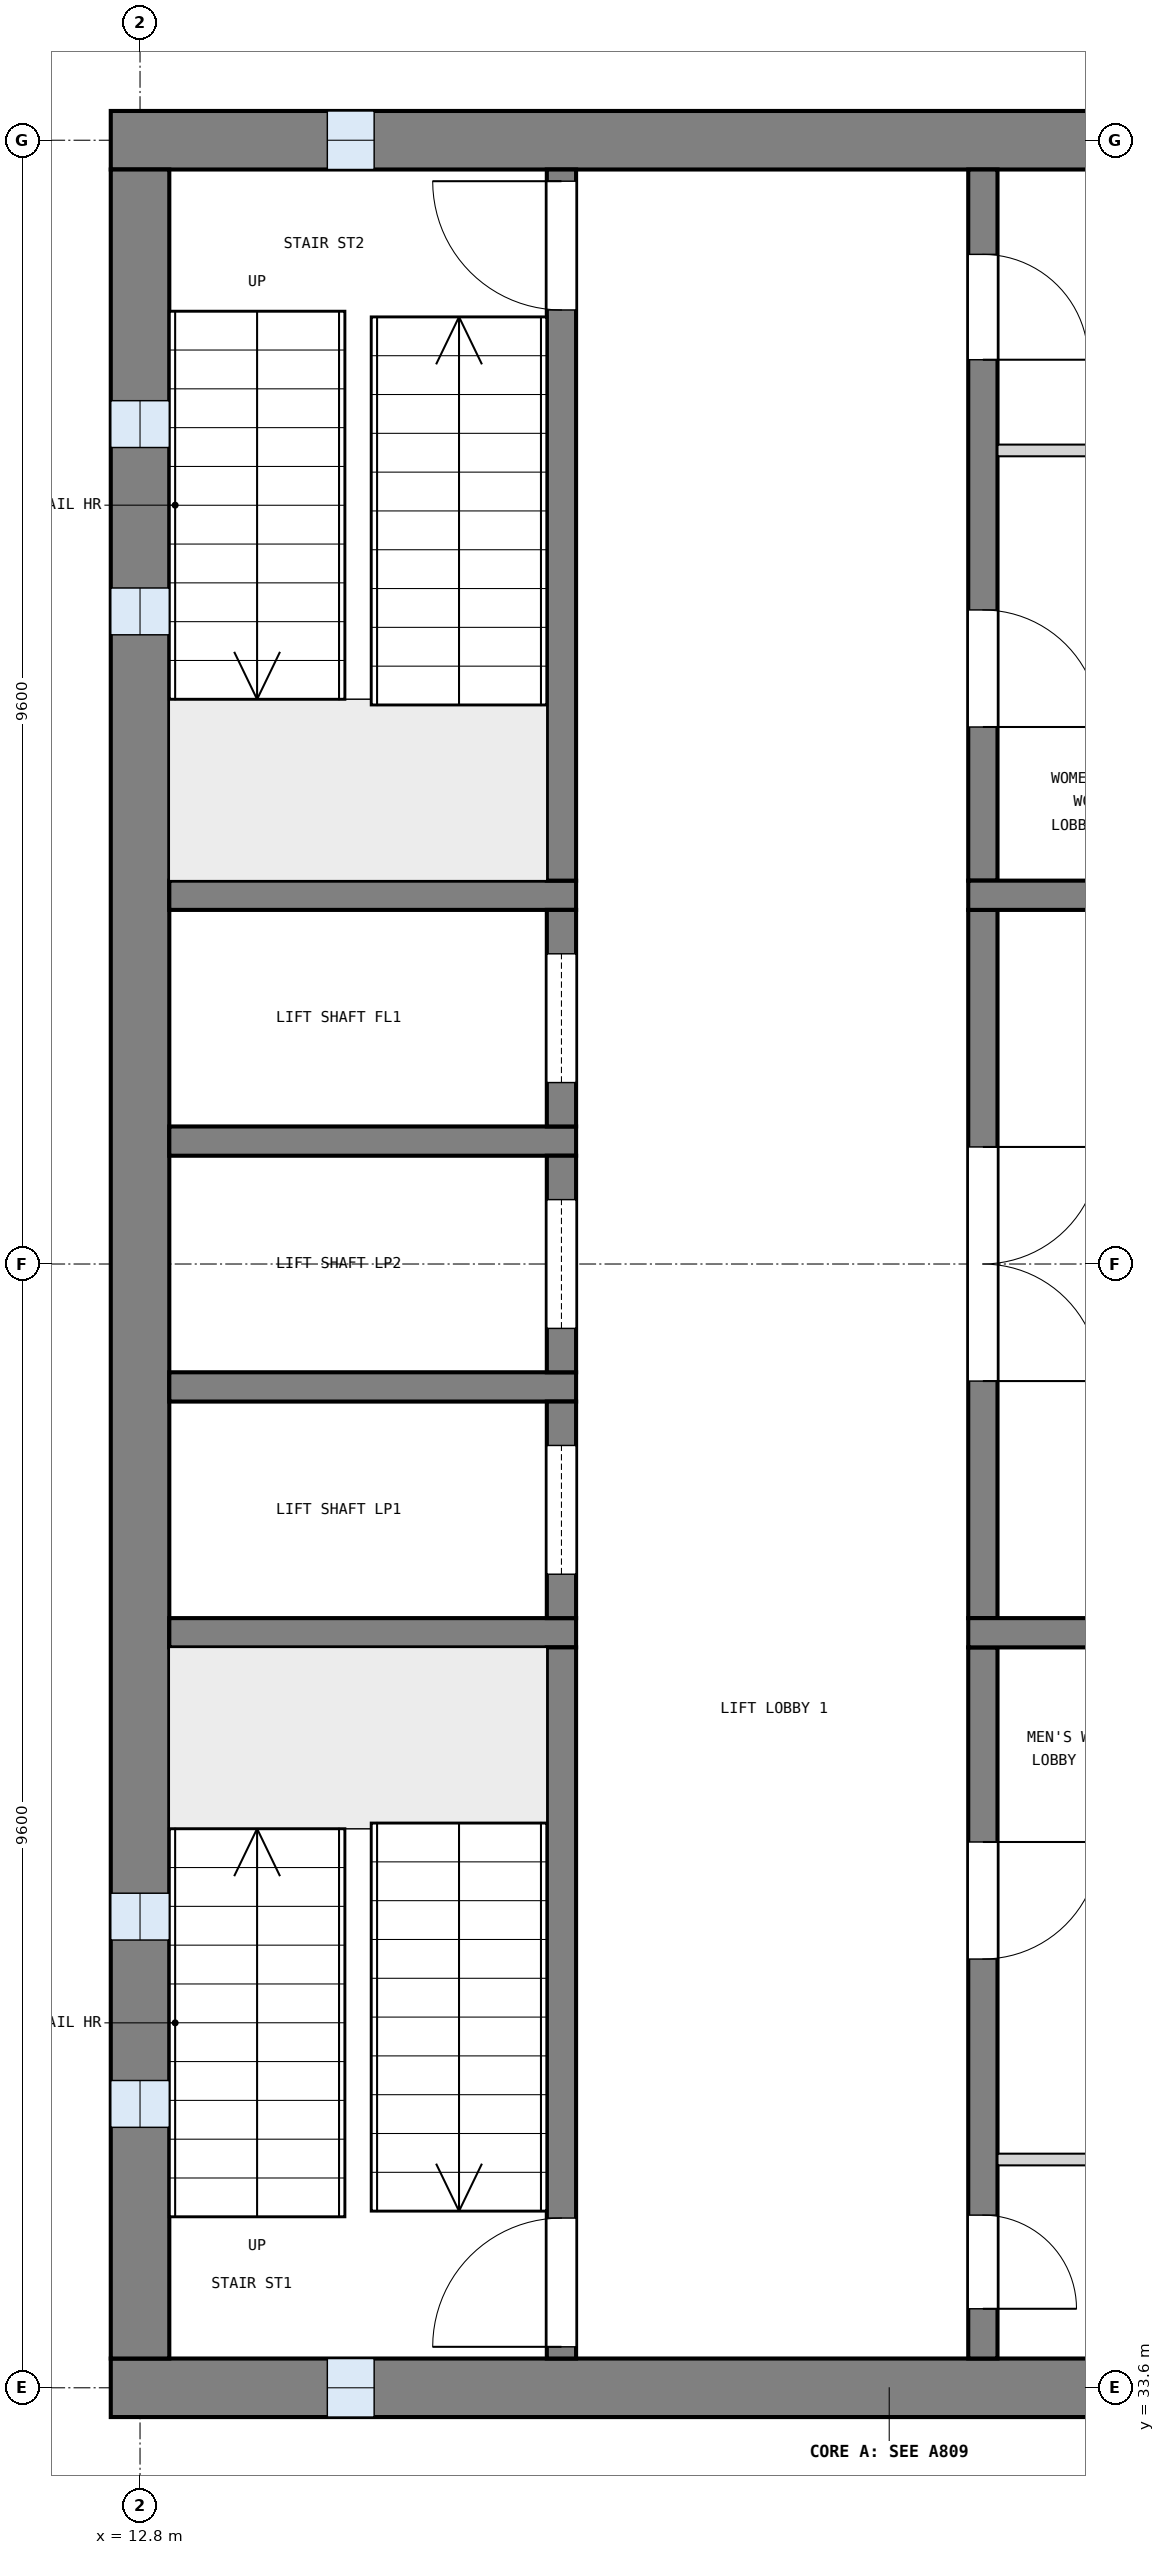
"""IFC4 building model, lengths in metres.
Left out: names, types, materials, properties, quantities, classifications, styles, units other than length and angle.
Written with IfcOpenShell. Run it as: python <this file> out.ifc"""

import sys

from ifc_helpers import new_model, si_unit, direction, frame, frame_2d, origin, place, context, subcontext, project, spatial, rectangle, extrude, element, fill, save


model = new_model("IFC4")
c1 = context("Model", 3, precision=1e-05, world=origin(), true_north=direction((0.0, 1.0)))
c2 = subcontext(c1, "Body", "Model", "MODEL_VIEW")
j1 = project(units=[si_unit("LENGTHUNIT", "METRE"), si_unit("PLANEANGLEUNIT", "RADIAN")], contexts=[c1])
p1 = place(None, origin())
s1 = spatial("IfcSite", under=j1, at=p1, CompositionType="ELEMENT")
p2 = place(p1, origin())
s2 = spatial("IfcBuilding", under=s1, at=p2, CompositionType="ELEMENT")
p3 = place(p2, frame((0.0, 0.0, 28.8)))
s3 = spatial("IfcBuildingStorey", under=s2, at=p3, CompositionType="ELEMENT", Elevation=28.8)
p4 = place(p3, frame((12.55, 52.8, 0.0), z_axis=(0.0, 0.0, 1.0), x_axis=(1.0, 0.0, 0.0)))
e1 = element("IfcWall", 1, at=p4, inside=s3, PredefinedType="SHEAR", context=c2, shape_type="SweptSolid", body=[
    extrude(rectangle(XDim=13.3, YDim=0.5, at=frame_2d((6.65, 0.0))), origin(), (0.0, 0.0, 1.0), 3.9),
])
p5 = place(p4, frame((1.85, 0.0, 1.0)))
e2 = element("IfcOpeningElement", 2, at=p5, cuts=e1, PredefinedType="OPENING", context=c2, shape_type="SweptSolid", body=[
    extrude(rectangle(XDim=0.4, YDim=2.0, at=frame_2d((0.2, 1.0))), frame((0.0, 0.26, 0.0), z_axis=(0.0, -1.0, 0.0), x_axis=(1.0, 0.0, 0.0)), (0.0, 0.0, 1.0), 0.52),
])
p6 = place(p3, frame((12.55, 33.6, 0.0), z_axis=(0.0, 0.0, 1.0), x_axis=(1.0, 0.0, 0.0)))
e3 = element("IfcWall", 3, at=p6, inside=s3, PredefinedType="SHEAR", context=c2, shape_type="SweptSolid", body=[
    extrude(rectangle(XDim=13.3, YDim=0.5, at=frame_2d((6.65, 0.0))), origin(), (0.0, 0.0, 1.0), 3.9),
])
p7 = place(p6, frame((1.85, 0.0, 1.0)))
e4 = element("IfcOpeningElement", 4, at=p7, cuts=e3, PredefinedType="OPENING", context=c2, shape_type="SweptSolid", body=[
    extrude(rectangle(XDim=0.4, YDim=2.0, at=frame_2d((0.2, 1.0))), frame((0.0, 0.26, 0.0), z_axis=(0.0, -1.0, 0.0), x_axis=(1.0, 0.0, 0.0)), (0.0, 0.0, 1.0), 0.52),
])
p8 = place(p3, frame((12.8, 33.85, 0.0), z_axis=(0.0, 0.0, 1.0), x_axis=(0.0, 1.0, 0.0)))
e5 = element("IfcWall", 5, at=p8, inside=s3, PredefinedType="SHEAR", context=c2, shape_type="SweptSolid", body=[
    extrude(rectangle(XDim=18.7, YDim=0.5, at=frame_2d((9.35, 0.0))), origin(), (0.0, 0.0, 1.0), 3.9),
])
p9 = place(p8, frame((1.975, 0.0, 1.0)))
e6 = element("IfcOpeningElement", 6, at=p9, cuts=e5, PredefinedType="OPENING", context=c2, shape_type="SweptSolid", body=[
    extrude(rectangle(XDim=0.4, YDim=2.0, at=frame_2d((0.2, 1.0))), frame((0.0, 0.26, 0.0), z_axis=(0.0, -1.0, 0.0), x_axis=(1.0, 0.0, 0.0)), (0.0, 0.0, 1.0), 0.52),
])
p10 = place(p8, frame((3.575, 0.0, 1.0)))
e7 = element("IfcOpeningElement", 7, at=p10, cuts=e5, PredefinedType="OPENING", context=c2, shape_type="SweptSolid", body=[
    extrude(rectangle(XDim=0.4, YDim=2.0, at=frame_2d((0.2, 1.0))), frame((0.0, 0.26, 0.0), z_axis=(0.0, -1.0, 0.0), x_axis=(1.0, 0.0, 0.0)), (0.0, 0.0, 1.0), 0.52),
])
p11 = place(p8, frame((14.725, 0.0, 1.0)))
e8 = element("IfcOpeningElement", 8, at=p11, cuts=e5, PredefinedType="OPENING", context=c2, shape_type="SweptSolid", body=[
    extrude(rectangle(XDim=0.4, YDim=2.0, at=frame_2d((0.2, 1.0))), frame((0.0, 0.26, 0.0), z_axis=(0.0, -1.0, 0.0), x_axis=(1.0, 0.0, 0.0)), (0.0, 0.0, 1.0), 0.52),
])
p12 = place(p8, frame((16.325, 0.0, 1.0)))
e9 = element("IfcOpeningElement", 9, at=p12, cuts=e5, PredefinedType="OPENING", context=c2, shape_type="SweptSolid", body=[
    extrude(rectangle(XDim=0.4, YDim=2.0, at=frame_2d((0.2, 1.0))), frame((0.0, 0.26, 0.0), z_axis=(0.0, -1.0, 0.0), x_axis=(1.0, 0.0, 0.0)), (0.0, 0.0, 1.0), 0.52),
])
for number, where, z_axis, x_axis in (
    (10, (13.05, 40.05, 0.0), (0.0, 0.0, 1.0), (1.0, 0.0, 0.0)),
    (11, (13.05, 42.15, 0.0), (0.0, 0.0, 1.0), (1.0, 0.0, 0.0)),
    (12, (13.05, 44.25, 0.0), (0.0, 0.0, 1.0), (1.0, 0.0, 0.0)),
    (13, (13.05, 46.35, 0.0), (0.0, 0.0, 1.0), (1.0, 0.0, 0.0)),
):
    element("IfcWall", number, at=place(p3, frame(where, z_axis=z_axis, x_axis=x_axis)), inside=s3, PredefinedType="SOLIDWALL", context=c2, shape_type="SweptSolid", body=[
        extrude(rectangle(XDim=3.475, YDim=0.25, at=frame_2d((1.737, 0.0))), origin(), (0.0, 0.0, 1.0), 3.6),
    ])
p13 = place(p3, frame((16.4, 33.85, 0.0), z_axis=(0.0, 0.0, 1.0), x_axis=(0.0, 1.0, 0.0)))
e14 = element("IfcWall", 14, at=p13, inside=s3, PredefinedType="SOLIDWALL", context=c2, shape_type="SweptSolid", body=[
    extrude(rectangle(XDim=6.075, YDim=0.25, at=frame_2d((3.038, 0.0))), origin(), (0.0, 0.0, 1.0), 3.6),
])
p14 = place(p13, frame((0.1, 0.0, 0.0)))
e15 = element("IfcOpeningElement", 15, at=p14, cuts=e14, PredefinedType="OPENING", context=c2, shape_type="SweptSolid", body=[
    extrude(rectangle(XDim=1.1, YDim=2.1, at=frame_2d((0.55, 1.05))), frame((0.0, 0.135, 0.0), z_axis=(0.0, -1.0, 0.0), x_axis=(1.0, 0.0, 0.0)), (0.0, 0.0, 1.0), 0.27),
])
p15 = place(p3, frame((16.4, 40.175, 0.0), z_axis=(0.0, 0.0, 1.0), x_axis=(0.0, 1.0, 0.0)))
e16 = element("IfcWall", 16, at=p15, inside=s3, PredefinedType="SOLIDWALL", context=c2, shape_type="SweptSolid", body=[
    extrude(rectangle(XDim=1.85, YDim=0.25, at=frame_2d((0.925, 0.0))), origin(), (0.0, 0.0, 1.0), 3.6),
])
p16 = place(p15, frame((0.375, 0.0, 0.0)))
e17 = element("IfcOpeningElement", 17, at=p16, cuts=e16, PredefinedType="OPENING", context=c2, shape_type="SweptSolid", body=[
    extrude(rectangle(XDim=1.1, YDim=2.1, at=frame_2d((0.55, 1.05))), frame((0.0, 0.135, 0.0), z_axis=(0.0, -1.0, 0.0), x_axis=(1.0, 0.0, 0.0)), (0.0, 0.0, 1.0), 0.27),
])
p17 = place(p3, frame((16.4, 42.275, 0.0), z_axis=(0.0, 0.0, 1.0), x_axis=(0.0, 1.0, 0.0)))
e18 = element("IfcWall", 18, at=p17, inside=s3, PredefinedType="SOLIDWALL", context=c2, shape_type="SweptSolid", body=[
    extrude(rectangle(XDim=1.85, YDim=0.25, at=frame_2d((0.925, 0.0))), origin(), (0.0, 0.0, 1.0), 3.6),
])
p18 = place(p17, frame((0.375, 0.0, 0.0)))
e19 = element("IfcOpeningElement", 19, at=p18, cuts=e18, PredefinedType="OPENING", context=c2, shape_type="SweptSolid", body=[
    extrude(rectangle(XDim=1.1, YDim=2.1, at=frame_2d((0.55, 1.05))), frame((0.0, 0.135, 0.0), z_axis=(0.0, -1.0, 0.0), x_axis=(1.0, 0.0, 0.0)), (0.0, 0.0, 1.0), 0.27),
])
p19 = place(p3, frame((16.4, 44.375, 0.0), z_axis=(0.0, 0.0, 1.0), x_axis=(0.0, 1.0, 0.0)))
e20 = element("IfcWall", 20, at=p19, inside=s3, PredefinedType="SOLIDWALL", context=c2, shape_type="SweptSolid", body=[
    extrude(rectangle(XDim=1.85, YDim=0.25, at=frame_2d((0.925, 0.0))), origin(), (0.0, 0.0, 1.0), 3.6),
])
p20 = place(p19, frame((0.375, 0.0, 0.0)))
e21 = element("IfcOpeningElement", 21, at=p20, cuts=e20, PredefinedType="OPENING", context=c2, shape_type="SweptSolid", body=[
    extrude(rectangle(XDim=1.1, YDim=2.1, at=frame_2d((0.55, 1.05))), frame((0.0, 0.135, 0.0), z_axis=(0.0, -1.0, 0.0), x_axis=(1.0, 0.0, 0.0)), (0.0, 0.0, 1.0), 0.27),
])
p21 = place(p3, frame((16.4, 46.475, 0.0), z_axis=(0.0, 0.0, 1.0), x_axis=(0.0, 1.0, 0.0)))
e22 = element("IfcWall", 22, at=p21, inside=s3, PredefinedType="SOLIDWALL", context=c2, shape_type="SweptSolid", body=[
    extrude(rectangle(XDim=6.075, YDim=0.25, at=frame_2d((3.038, 0.0))), origin(), (0.0, 0.0, 1.0), 3.6),
])
p22 = place(p21, frame((4.875, 0.0, 0.0)))
e23 = element("IfcOpeningElement", 23, at=p22, cuts=e22, PredefinedType="OPENING", context=c2, shape_type="SweptSolid", body=[
    extrude(rectangle(XDim=1.1, YDim=2.1, at=frame_2d((0.55, 1.05))), frame((0.0, 0.135, 0.0), z_axis=(0.0, -1.0, 0.0), x_axis=(1.0, 0.0, 0.0)), (0.0, 0.0, 1.0), 0.27),
])
p23 = place(p3, frame((20.0, 33.85, 0.0), z_axis=(0.0, 0.0, 1.0), x_axis=(0.0, 1.0, 0.0)))
e24 = element("IfcWall", 24, at=p23, inside=s3, PredefinedType="SOLIDWALL", context=c2, shape_type="SweptSolid", body=[
    extrude(rectangle(XDim=6.075, YDim=0.25, at=frame_2d((3.038, 0.0))), origin(), (0.0, 0.0, 1.0), 3.6),
])
p24 = place(p23, frame((0.425, 0.0, 0.0)))
e25 = element("IfcOpeningElement", 25, at=p24, cuts=e24, PredefinedType="OPENING", context=c2, shape_type="SweptSolid", body=[
    extrude(rectangle(XDim=0.8, YDim=2.1, at=frame_2d((0.4, 1.05))), frame((0.0, 0.135, 0.0), z_axis=(0.0, -1.0, 0.0), x_axis=(1.0, 0.0, 0.0)), (0.0, 0.0, 1.0), 0.27),
])
p25 = place(p23, frame((3.413, 0.0, 0.0)))
e26 = element("IfcOpeningElement", 26, at=p25, cuts=e24, PredefinedType="OPENING", context=c2, shape_type="SweptSolid", body=[
    extrude(rectangle(XDim=1.0, YDim=2.1, at=frame_2d((0.5, 1.05))), frame((0.0, 0.135, 0.0), z_axis=(0.0, -1.0, 0.0), x_axis=(1.0, 0.0, 0.0)), (0.0, 0.0, 1.0), 0.27),
])
p26 = place(p3, frame((20.0, 40.175, 0.0), z_axis=(0.0, 0.0, 1.0), x_axis=(0.0, 1.0, 0.0)))
e27 = element("IfcWall", 27, at=p26, inside=s3, PredefinedType="SOLIDWALL", context=c2, shape_type="SweptSolid", body=[
    extrude(rectangle(XDim=6.05, YDim=0.25, at=frame_2d((3.025, 0.0))), origin(), (0.0, 0.0, 1.0), 3.6),
])
p27 = place(p26, frame((2.025, 0.0, 0.0)))
e28 = element("IfcOpeningElement", 28, at=p27, cuts=e27, PredefinedType="OPENING", context=c2, shape_type="SweptSolid", body=[
    extrude(rectangle(XDim=2.0, YDim=2.1, at=frame_2d((1.0, 1.05))), frame((0.0, 0.135, 0.0), z_axis=(0.0, -1.0, 0.0), x_axis=(1.0, 0.0, 0.0)), (0.0, 0.0, 1.0), 0.27),
])
p28 = place(p3, frame((20.0, 46.475, 0.0), z_axis=(0.0, 0.0, 1.0), x_axis=(0.0, 1.0, 0.0)))
e29 = element("IfcWall", 29, at=p28, inside=s3, PredefinedType="SOLIDWALL", context=c2, shape_type="SweptSolid", body=[
    extrude(rectangle(XDim=6.075, YDim=0.25, at=frame_2d((3.038, 0.0))), origin(), (0.0, 0.0, 1.0), 3.6),
])
p29 = place(p28, frame((1.312, 0.0, 0.0)))
e30 = element("IfcOpeningElement", 30, at=p29, cuts=e29, PredefinedType="OPENING", context=c2, shape_type="SweptSolid", body=[
    extrude(rectangle(XDim=1.0, YDim=2.1, at=frame_2d((0.5, 1.05))), frame((0.0, 0.135, 0.0), z_axis=(0.0, -1.0, 0.0), x_axis=(1.0, 0.0, 0.0)), (0.0, 0.0, 1.0), 0.27),
])
p30 = place(p28, frame((4.45, 0.0, 0.0)))
e31 = element("IfcOpeningElement", 31, at=p30, cuts=e29, PredefinedType="OPENING", context=c2, shape_type="SweptSolid", body=[
    extrude(rectangle(XDim=0.9, YDim=2.1, at=frame_2d((0.45, 1.05))), frame((0.0, 0.135, 0.0), z_axis=(0.0, -1.0, 0.0), x_axis=(1.0, 0.0, 0.0)), (0.0, 0.0, 1.0), 0.27),
])
for number, where, z_axis, x_axis in (
    (32, (19.875, 40.05, 0.0), (0.0, 0.0, 1.0), (1.0, 0.0, 0.0)),
    (33, (19.875, 46.35, 0.0), (0.0, 0.0, 1.0), (1.0, 0.0, 0.0)),
):
    element("IfcWall", number, at=place(p3, frame(where, z_axis=z_axis, x_axis=x_axis)), inside=s3, PredefinedType="SOLIDWALL", context=c2, shape_type="SweptSolid", body=[
        extrude(rectangle(XDim=5.475, YDim=0.25, at=frame_2d((2.738, 0.0))), origin(), (0.0, 0.0, 1.0), 3.6),
    ])
for number, where, z_axis, x_axis in (
    (34, (20.125, 35.55, 0.0), (0.0, 0.0, 1.0), (1.0, 0.0, 0.0)),
    (35, (20.125, 50.15, 0.0), (0.0, 0.0, 1.0), (1.0, 0.0, 0.0)),
):
    element("IfcWall", number, at=place(p3, frame(where, z_axis=z_axis, x_axis=x_axis)), inside=s3, PredefinedType="PARTITIONING", context=c2, shape_type="SweptSolid", body=[
        extrude(rectangle(XDim=5.225, YDim=0.1, at=frame_2d((2.613, 0.0))), origin(), (0.0, 0.0, 1.0), 3.6),
    ])
p31 = place(p9, origin())
e36 = element("IfcWindow", 36, at=p31, inside=s3, PartitioningType="SINGLE_PANEL", PredefinedType="WINDOW", context=c2, shape_type="SweptSolid", body=[
    extrude(rectangle(XDim=0.4, YDim=2.0, at=frame_2d((0.2, 1.0))), frame((0.0, 0.03, 0.0), z_axis=(0.0, -1.0, 0.0), x_axis=(1.0, 0.0, 0.0)), (0.0, 0.0, 1.0), 0.06),
])
fill(e6, e36)
p32 = place(p10, origin())
e37 = element("IfcWindow", 37, at=p32, inside=s3, PartitioningType="SINGLE_PANEL", PredefinedType="WINDOW", context=c2, shape_type="SweptSolid", body=[
    extrude(rectangle(XDim=0.4, YDim=2.0, at=frame_2d((0.2, 1.0))), frame((0.0, 0.03, 0.0), z_axis=(0.0, -1.0, 0.0), x_axis=(1.0, 0.0, 0.0)), (0.0, 0.0, 1.0), 0.06),
])
fill(e7, e37)
p33 = place(p11, origin())
e38 = element("IfcWindow", 38, at=p33, inside=s3, PartitioningType="SINGLE_PANEL", PredefinedType="WINDOW", context=c2, shape_type="SweptSolid", body=[
    extrude(rectangle(XDim=0.4, YDim=2.0, at=frame_2d((0.2, 1.0))), frame((0.0, 0.03, 0.0), z_axis=(0.0, -1.0, 0.0), x_axis=(1.0, 0.0, 0.0)), (0.0, 0.0, 1.0), 0.06),
])
fill(e8, e38)
p34 = place(p12, origin())
e39 = element("IfcWindow", 39, at=p34, inside=s3, PartitioningType="SINGLE_PANEL", PredefinedType="WINDOW", context=c2, shape_type="SweptSolid", body=[
    extrude(rectangle(XDim=0.4, YDim=2.0, at=frame_2d((0.2, 1.0))), frame((0.0, 0.03, 0.0), z_axis=(0.0, -1.0, 0.0), x_axis=(1.0, 0.0, 0.0)), (0.0, 0.0, 1.0), 0.06),
])
fill(e9, e39)
p35 = place(p7, origin())
e40 = element("IfcWindow", 40, at=p35, inside=s3, PartitioningType="SINGLE_PANEL", PredefinedType="WINDOW", context=c2, shape_type="SweptSolid", body=[
    extrude(rectangle(XDim=0.4, YDim=2.0, at=frame_2d((0.2, 1.0))), frame((0.0, 0.03, 0.0), z_axis=(0.0, -1.0, 0.0), x_axis=(1.0, 0.0, 0.0)), (0.0, 0.0, 1.0), 0.06),
])
fill(e4, e40)
p36 = place(p5, origin())
e41 = element("IfcWindow", 41, at=p36, inside=s3, PartitioningType="SINGLE_PANEL", PredefinedType="WINDOW", context=c2, shape_type="SweptSolid", body=[
    extrude(rectangle(XDim=0.4, YDim=2.0, at=frame_2d((0.2, 1.0))), frame((0.0, 0.03, 0.0), z_axis=(0.0, -1.0, 0.0), x_axis=(1.0, 0.0, 0.0)), (0.0, 0.0, 1.0), 0.06),
])
fill(e2, e41)
p37 = place(p14, origin())
e42 = element("IfcDoor", 42, at=p37, inside=s3, OperationType="SINGLE_SWING_LEFT", PredefinedType="DOOR", context=c2, shape_type="SweptSolid", body=[
    extrude(rectangle(XDim=1.1, YDim=2.1, at=frame_2d((0.55, 1.05))), frame((0.0, 0.025, 0.0), z_axis=(0.0, -1.0, 0.0), x_axis=(1.0, 0.0, 0.0)), (0.0, 0.0, 1.0), 0.05),
])
fill(e15, e42)
p38 = place(p22, origin())
e43 = element("IfcDoor", 43, at=p38, inside=s3, OperationType="SINGLE_SWING_RIGHT", PredefinedType="DOOR", context=c2, shape_type="SweptSolid", body=[
    extrude(rectangle(XDim=1.1, YDim=2.1, at=frame_2d((0.55, 1.05))), frame((0.0, 0.025, 0.0), z_axis=(0.0, -1.0, 0.0), x_axis=(1.0, 0.0, 0.0)), (0.0, 0.0, 1.0), 0.05),
])
fill(e23, e43)
p39 = place(p16, origin())
e44 = element("IfcDoor", 44, at=p39, inside=s3, OperationType="SLIDING_TO_LEFT", PredefinedType="DOOR", context=c2, shape_type="SweptSolid", body=[
    extrude(rectangle(XDim=1.1, YDim=2.1, at=frame_2d((0.55, 1.05))), frame((0.0, 0.025, 0.0), z_axis=(0.0, -1.0, 0.0), x_axis=(1.0, 0.0, 0.0)), (0.0, 0.0, 1.0), 0.05),
])
fill(e17, e44)
p40 = place(p18, origin())
e45 = element("IfcDoor", 45, at=p40, inside=s3, OperationType="SLIDING_TO_LEFT", PredefinedType="DOOR", context=c2, shape_type="SweptSolid", body=[
    extrude(rectangle(XDim=1.1, YDim=2.1, at=frame_2d((0.55, 1.05))), frame((0.0, 0.025, 0.0), z_axis=(0.0, -1.0, 0.0), x_axis=(1.0, 0.0, 0.0)), (0.0, 0.0, 1.0), 0.05),
])
fill(e19, e45)
p41 = place(p20, origin())
e46 = element("IfcDoor", 46, at=p41, inside=s3, OperationType="SLIDING_TO_LEFT", PredefinedType="DOOR", context=c2, shape_type="SweptSolid", body=[
    extrude(rectangle(XDim=1.1, YDim=2.1, at=frame_2d((0.55, 1.05))), frame((0.0, 0.025, 0.0), z_axis=(0.0, -1.0, 0.0), x_axis=(1.0, 0.0, 0.0)), (0.0, 0.0, 1.0), 0.05),
])
fill(e21, e46)
p42 = place(p27, frame((2.0, 0.0, 0.0), z_axis=(0.0, 0.0, 1.0), x_axis=(-1.0, 0.0, 0.0)))
e47 = element("IfcDoor", 47, at=p42, inside=s3, OperationType="DOUBLE_DOOR_SINGLE_SWING", PredefinedType="DOOR", context=c2, shape_type="SweptSolid", body=[
    extrude(rectangle(XDim=2.0, YDim=2.1, at=frame_2d((1.0, 1.05))), frame((0.0, 0.025, 0.0), z_axis=(0.0, -1.0, 0.0), x_axis=(1.0, 0.0, 0.0)), (0.0, 0.0, 1.0), 0.05),
])
fill(e28, e47)
p43 = place(p24, frame((0.8, 0.0, 0.0), z_axis=(0.0, 0.0, 1.0), x_axis=(-1.0, 0.0, 0.0)))
e48 = element("IfcDoor", 48, at=p43, inside=s3, OperationType="SINGLE_SWING_RIGHT", PredefinedType="DOOR", context=c2, shape_type="SweptSolid", body=[
    extrude(rectangle(XDim=0.8, YDim=2.1, at=frame_2d((0.4, 1.05))), frame((0.0, 0.025, 0.0), z_axis=(0.0, -1.0, 0.0), x_axis=(1.0, 0.0, 0.0)), (0.0, 0.0, 1.0), 0.05),
])
fill(e25, e48)
p44 = place(p25, frame((1.0, 0.0, 0.0), z_axis=(0.0, 0.0, 1.0), x_axis=(-1.0, 0.0, 0.0)))
e49 = element("IfcDoor", 49, at=p44, inside=s3, OperationType="SINGLE_SWING_LEFT", PredefinedType="DOOR", context=c2, shape_type="SweptSolid", body=[
    extrude(rectangle(XDim=1.0, YDim=2.1, at=frame_2d((0.5, 1.05))), frame((0.0, 0.025, 0.0), z_axis=(0.0, -1.0, 0.0), x_axis=(1.0, 0.0, 0.0)), (0.0, 0.0, 1.0), 0.05),
])
fill(e26, e49)
p45 = place(p29, frame((1.0, 0.0, 0.0), z_axis=(0.0, 0.0, 1.0), x_axis=(-1.0, 0.0, 0.0)))
e50 = element("IfcDoor", 50, at=p45, inside=s3, OperationType="SINGLE_SWING_RIGHT", PredefinedType="DOOR", context=c2, shape_type="SweptSolid", body=[
    extrude(rectangle(XDim=1.0, YDim=2.1, at=frame_2d((0.5, 1.05))), frame((0.0, 0.025, 0.0), z_axis=(0.0, -1.0, 0.0), x_axis=(1.0, 0.0, 0.0)), (0.0, 0.0, 1.0), 0.05),
])
fill(e30, e50)
p46 = place(p30, frame((0.9, 0.0, 0.0), z_axis=(0.0, 0.0, 1.0), x_axis=(-1.0, 0.0, 0.0)))
e51 = element("IfcDoor", 51, at=p46, inside=s3, OperationType="SINGLE_SWING_RIGHT", PredefinedType="DOOR", context=c2, shape_type="SweptSolid", body=[
    extrude(rectangle(XDim=0.9, YDim=2.1, at=frame_2d((0.45, 1.05))), frame((0.0, 0.025, 0.0), z_axis=(0.0, -1.0, 0.0), x_axis=(1.0, 0.0, 0.0)), (0.0, 0.0, 1.0), 0.05),
])
fill(e31, e51)
save(model, sys.argv[1])
